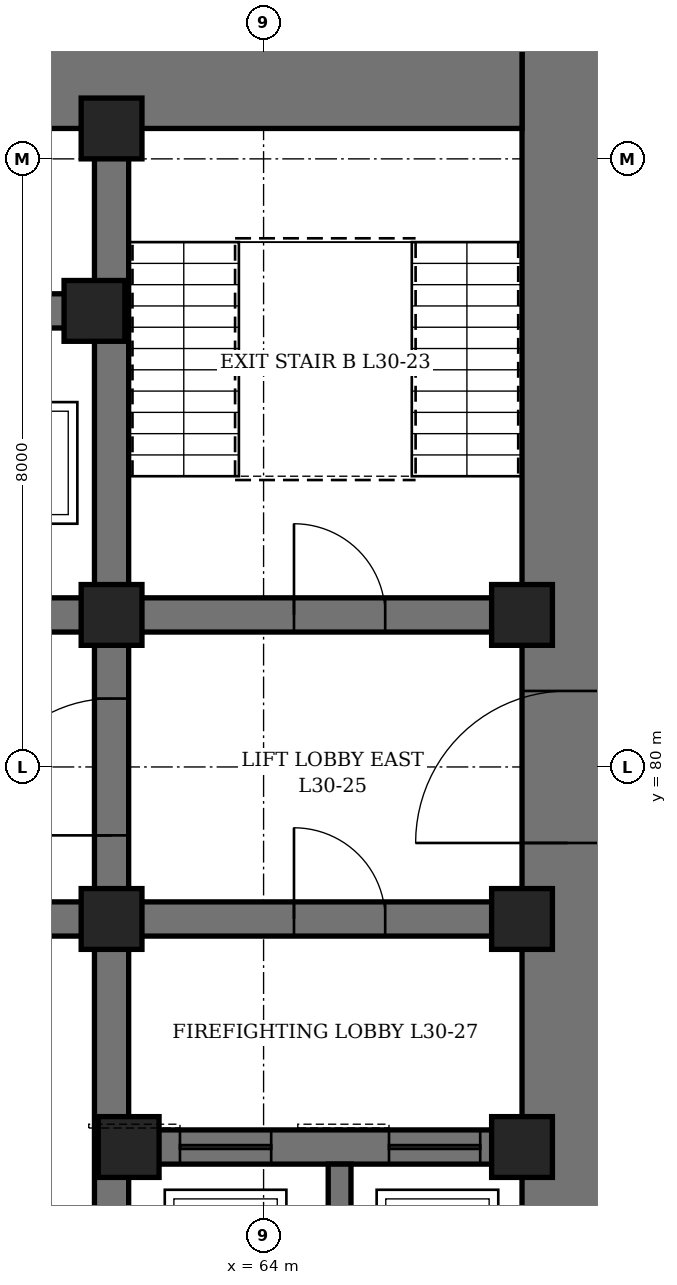
"""IFC4 building model, lengths in metres.
Left out: names, types, materials, properties, quantities, classifications, styles, units other than length and angle.
Written with IfcOpenShell. Run it as: python <this file> out.ifc"""

import sys

from ifc_helpers import new_model, si_unit, direction, frame, frame_2d, origin, origin_2d, place, context, subcontext, project, spatial, rectangle, hollow_rectangle, extrude, element, fill, save


model = new_model("IFC4")
c1 = context("Model", 3, precision=1e-05, world=origin(), true_north=direction((0.0, 1.0)))
c2 = subcontext(c1, "Body", "Model", "MODEL_VIEW")
j1 = project(units=[si_unit("LENGTHUNIT", "METRE"), si_unit("PLANEANGLEUNIT", "RADIAN")], contexts=[c1])
p1 = place(None, origin())
s1 = spatial("IfcSite", under=j1, at=p1, CompositionType="ELEMENT")
p2 = place(p1, origin())
s2 = spatial("IfcBuilding", under=s1, at=p2, CompositionType="ELEMENT")
p3 = place(p2, frame((0.0, 0.0, 137.5)))
s3 = spatial("IfcBuildingStorey", under=s2, at=p3, CompositionType="ELEMENT", Elevation=137.5)
p4 = place(p3, frame((68.0, 70.4, 0.0), z_axis=(0.0, 0.0, 1.0), x_axis=(0.0, 1.0, 0.0)))
e1 = element("IfcWall", 1, at=p4, inside=s3, PredefinedType="SHEAR", context=c2, shape_type="SweptSolid", body=[
    extrude(rectangle(XDim=19.2, YDim=1.2, at=frame_2d((9.6, 0.0))), origin(), (0.0, 0.0, 1.0), 4.2),
])
p5 = place(p4, frame((8.6, 0.0, 0.0)))
e2 = element("IfcOpeningElement", 2, at=p5, cuts=e1, PredefinedType="OPENING", context=c2, shape_type="SweptSolid", body=[
    extrude(rectangle(XDim=2.0, YDim=2.4, at=frame_2d((1.0, 1.2))), frame((0.0, 0.61, 0.0), z_axis=(0.0, -1.0, 0.0), x_axis=(1.0, 0.0, 0.0)), (0.0, 0.0, 1.0), 1.22),
])
p6 = place(p3, frame((44.6, 89.0, 0.0), z_axis=(0.0, 0.0, 1.0), x_axis=(1.0, 0.0, 0.0)))
e3 = element("IfcWall", 3, at=p6, inside=s3, PredefinedType="SHEAR", context=c2, shape_type="SweptSolid", body=[
    extrude(rectangle(XDim=22.8, YDim=1.2, at=frame_2d((11.4, 0.0))), origin(), (0.0, 0.0, 1.0), 4.2),
])
p7 = place(p6, frame((6.325, 0.0, 0.0)))
e4 = element("IfcOpeningElement", 4, at=p7, cuts=e3, PredefinedType="OPENING", context=c2, shape_type="SweptSolid", body=[
    extrude(rectangle(XDim=1.0, YDim=2.1, at=frame_2d((0.5, 1.05))), frame((0.0, 0.61, 0.0), z_axis=(0.0, -1.0, 0.0), x_axis=(1.0, 0.0, 0.0)), (0.0, 0.0, 1.0), 1.22),
])
p8 = place(p6, frame((9.25, 0.0, 0.0)))
e5 = element("IfcOpeningElement", 5, at=p8, cuts=e3, PredefinedType="OPENING", context=c2, shape_type="SweptSolid", body=[
    extrude(rectangle(XDim=0.9, YDim=2.1, at=frame_2d((0.45, 1.05))), frame((0.0, 0.61, 0.0), z_axis=(0.0, -1.0, 0.0), x_axis=(1.0, 0.0, 0.0)), (0.0, 0.0, 1.0), 1.22),
])
p9 = place(p6, frame((12.025, 0.0, 0.0)))
e6 = element("IfcOpeningElement", 6, at=p9, cuts=e3, PredefinedType="OPENING", context=c2, shape_type="SweptSolid", body=[
    extrude(rectangle(XDim=0.9, YDim=2.1, at=frame_2d((0.45, 1.05))), frame((0.0, 0.61, 0.0), z_axis=(0.0, -1.0, 0.0), x_axis=(1.0, 0.0, 0.0)), (0.0, 0.0, 1.0), 1.22),
])
p10 = place(p6, frame((13.962, 0.0, 0.0)))
e7 = element("IfcOpeningElement", 7, at=p10, cuts=e3, PredefinedType="OPENING", context=c2, shape_type="SweptSolid", body=[
    extrude(rectangle(XDim=0.9, YDim=2.1, at=frame_2d((0.45, 1.05))), frame((0.0, 0.61, 0.0), z_axis=(0.0, -1.0, 0.0), x_axis=(1.0, 0.0, 0.0)), (0.0, 0.0, 1.0), 1.22),
])
p11 = place(p3, frame((62.0, 71.6, 0.0), z_axis=(0.0, 0.0, 1.0), x_axis=(0.0, 1.0, 0.0)))
e8 = element("IfcWall", 8, at=p11, inside=s3, PredefinedType="SHEAR", context=c2, shape_type="SweptSolid", body=[
    extrude(rectangle(XDim=16.8, YDim=0.45, at=frame_2d((8.4, 0.0))), origin(), (0.0, 0.0, 1.0), 4.2),
])
p12 = place(p11, frame((7.5, 0.0, 0.0)))
e9 = element("IfcOpeningElement", 9, at=p12, cuts=e8, PredefinedType="OPENING", context=c2, shape_type="SweptSolid", body=[
    extrude(rectangle(XDim=1.8, YDim=2.4, at=frame_2d((0.9, 1.2))), frame((0.0, 0.235, 0.0), z_axis=(0.0, -1.0, 0.0), x_axis=(1.0, 0.0, 0.0)), (0.0, 0.0, 1.0), 0.47),
])
p13 = place(p3, frame((62.225, 75.0, 0.0), z_axis=(0.0, 0.0, 1.0), x_axis=(1.0, 0.0, 0.0)))
e10 = element("IfcWall", 10, at=p13, inside=s3, PredefinedType="SHEAR", context=c2, shape_type="SweptSolid", body=[
    extrude(rectangle(XDim=5.175, YDim=0.45, at=frame_2d((2.587, 0.0))), origin(), (0.0, 0.0, 1.0), 4.2),
])
p14 = place(p13, frame((0.675, 0.0, 0.0)))
e11 = element("IfcOpeningElement", 11, at=p14, cuts=e10, PredefinedType="OPENING", context=c2, shape_type="SweptSolid", body=[
    extrude(rectangle(XDim=1.2, YDim=2.2, at=frame_2d((0.6, 1.1))), frame((0.0, 0.235, 0.0), z_axis=(0.0, -1.0, 0.0), x_axis=(1.0, 0.0, 0.0)), (0.0, 0.0, 1.0), 0.47),
])
p15 = place(p13, frame((3.425, 0.0, 0.0)))
e12 = element("IfcOpeningElement", 12, at=p15, cuts=e10, PredefinedType="OPENING", context=c2, shape_type="SweptSolid", body=[
    extrude(rectangle(XDim=1.2, YDim=2.2, at=frame_2d((0.6, 1.1))), frame((0.0, 0.235, 0.0), z_axis=(0.0, -1.0, 0.0), x_axis=(1.0, 0.0, 0.0)), (0.0, 0.0, 1.0), 0.47),
])
p16 = place(p3, frame((62.225, 78.0, 0.0), z_axis=(0.0, 0.0, 1.0), x_axis=(1.0, 0.0, 0.0)))
e13 = element("IfcWall", 13, at=p16, inside=s3, PredefinedType="SHEAR", context=c2, shape_type="SweptSolid", body=[
    extrude(rectangle(XDim=5.175, YDim=0.45, at=frame_2d((2.587, 0.0))), origin(), (0.0, 0.0, 1.0), 4.2),
])
p17 = place(p16, frame((2.175, 0.0, 0.0)))
e14 = element("IfcOpeningElement", 14, at=p17, cuts=e13, PredefinedType="OPENING", context=c2, shape_type="SweptSolid", body=[
    extrude(rectangle(XDim=1.2, YDim=2.1, at=frame_2d((0.6, 1.05))), frame((0.0, 0.235, 0.0), z_axis=(0.0, -1.0, 0.0), x_axis=(1.0, 0.0, 0.0)), (0.0, 0.0, 1.0), 0.47),
])
p18 = place(p3, frame((62.225, 82.0, 0.0), z_axis=(0.0, 0.0, 1.0), x_axis=(1.0, 0.0, 0.0)))
e15 = element("IfcWall", 15, at=p18, inside=s3, PredefinedType="SHEAR", context=c2, shape_type="SweptSolid", body=[
    extrude(rectangle(XDim=5.175, YDim=0.45, at=frame_2d((2.587, 0.0))), origin(), (0.0, 0.0, 1.0), 4.2),
])
p19 = place(p18, frame((2.175, 0.0, 0.0)))
e16 = element("IfcOpeningElement", 16, at=p19, cuts=e15, PredefinedType="OPENING", context=c2, shape_type="SweptSolid", body=[
    extrude(rectangle(XDim=1.2, YDim=2.1, at=frame_2d((0.6, 1.05))), frame((0.0, 0.235, 0.0), z_axis=(0.0, -1.0, 0.0), x_axis=(1.0, 0.0, 0.0)), (0.0, 0.0, 1.0), 0.47),
])
p20 = place(p3, frame((50.225, 78.0, 0.0), z_axis=(0.0, 0.0, 1.0), x_axis=(1.0, 0.0, 0.0)))
e17 = element("IfcWall", 17, at=p20, inside=s3, PredefinedType="SHEAR", context=c2, shape_type="SweptSolid", body=[
    extrude(rectangle(XDim=11.55, YDim=0.45, at=frame_2d((5.775, 0.0))), origin(), (0.0, 0.0, 1.0), 4.2),
])
p21 = place(p20, frame((0.825, 0.0, 0.0)))
e18 = element("IfcOpeningElement", 18, at=p21, cuts=e17, PredefinedType="OPENING", context=c2, shape_type="SweptSolid", body=[
    extrude(rectangle(XDim=0.9, YDim=2.1, at=frame_2d((0.45, 1.05))), frame((0.0, 0.235, 0.0), z_axis=(0.0, -1.0, 0.0), x_axis=(1.0, 0.0, 0.0)), (0.0, 0.0, 1.0), 0.47),
])
p22 = place(p20, frame((3.825, 0.0, 0.0)))
e19 = element("IfcOpeningElement", 19, at=p22, cuts=e17, PredefinedType="OPENING", context=c2, shape_type="SweptSolid", body=[
    extrude(rectangle(XDim=0.9, YDim=2.1, at=frame_2d((0.45, 1.05))), frame((0.0, 0.235, 0.0), z_axis=(0.0, -1.0, 0.0), x_axis=(1.0, 0.0, 0.0)), (0.0, 0.0, 1.0), 0.47),
])
p23 = place(p20, frame((6.825, 0.0, 0.0)))
e20 = element("IfcOpeningElement", 20, at=p23, cuts=e17, PredefinedType="OPENING", context=c2, shape_type="SweptSolid", body=[
    extrude(rectangle(XDim=0.9, YDim=2.1, at=frame_2d((0.45, 1.05))), frame((0.0, 0.235, 0.0), z_axis=(0.0, -1.0, 0.0), x_axis=(1.0, 0.0, 0.0)), (0.0, 0.0, 1.0), 0.47),
])
p24 = place(p20, frame((9.825, 0.0, 0.0)))
e21 = element("IfcOpeningElement", 21, at=p24, cuts=e17, PredefinedType="OPENING", context=c2, shape_type="SweptSolid", body=[
    extrude(rectangle(XDim=0.9, YDim=2.1, at=frame_2d((0.45, 1.05))), frame((0.0, 0.235, 0.0), z_axis=(0.0, -1.0, 0.0), x_axis=(1.0, 0.0, 0.0)), (0.0, 0.0, 1.0), 0.47),
])
p25 = place(p3, frame((50.225, 82.0, 0.0), z_axis=(0.0, 0.0, 1.0), x_axis=(1.0, 0.0, 0.0)))
e22 = element("IfcWall", 22, at=p25, inside=s3, PredefinedType="SHEAR", context=c2, shape_type="SweptSolid", body=[
    extrude(rectangle(XDim=11.55, YDim=0.45, at=frame_2d((5.775, 0.0))), origin(), (0.0, 0.0, 1.0), 4.2),
])
p26 = place(p25, frame((0.725, 0.0, 0.0)))
e23 = element("IfcOpeningElement", 23, at=p26, cuts=e22, PredefinedType="OPENING", context=c2, shape_type="SweptSolid", body=[
    extrude(rectangle(XDim=1.1, YDim=2.2, at=frame_2d((0.55, 1.1))), frame((0.0, 0.235, 0.0), z_axis=(0.0, -1.0, 0.0), x_axis=(1.0, 0.0, 0.0)), (0.0, 0.0, 1.0), 0.47),
])
p27 = place(p25, frame((3.725, 0.0, 0.0)))
e24 = element("IfcOpeningElement", 24, at=p27, cuts=e22, PredefinedType="OPENING", context=c2, shape_type="SweptSolid", body=[
    extrude(rectangle(XDim=1.1, YDim=2.2, at=frame_2d((0.55, 1.1))), frame((0.0, 0.235, 0.0), z_axis=(0.0, -1.0, 0.0), x_axis=(1.0, 0.0, 0.0)), (0.0, 0.0, 1.0), 0.47),
])
p28 = place(p25, frame((6.725, 0.0, 0.0)))
e25 = element("IfcOpeningElement", 25, at=p28, cuts=e22, PredefinedType="OPENING", context=c2, shape_type="SweptSolid", body=[
    extrude(rectangle(XDim=1.1, YDim=2.2, at=frame_2d((0.55, 1.1))), frame((0.0, 0.235, 0.0), z_axis=(0.0, -1.0, 0.0), x_axis=(1.0, 0.0, 0.0)), (0.0, 0.0, 1.0), 0.47),
])
p29 = place(p25, frame((9.725, 0.0, 0.0)))
e26 = element("IfcOpeningElement", 26, at=p29, cuts=e22, PredefinedType="OPENING", context=c2, shape_type="SweptSolid", body=[
    extrude(rectangle(XDim=1.1, YDim=2.2, at=frame_2d((0.55, 1.1))), frame((0.0, 0.235, 0.0), z_axis=(0.0, -1.0, 0.0), x_axis=(1.0, 0.0, 0.0)), (0.0, 0.0, 1.0), 0.47),
])
p30 = place(p3, frame((50.225, 86.0, 0.0), z_axis=(0.0, 0.0, 1.0), x_axis=(1.0, 0.0, 0.0)))
e27 = element("IfcWall", 27, at=p30, inside=s3, PredefinedType="SHEAR", context=c2, shape_type="SweptSolid", body=[
    extrude(rectangle(XDim=11.55, YDim=0.45, at=frame_2d((5.775, 0.0))), origin(), (0.0, 0.0, 1.0), 4.2),
])
p31 = place(p3, frame((65.0, 71.6, 0.0), z_axis=(0.0, 0.0, 1.0), x_axis=(0.0, 1.0, 0.0)))
e28 = element("IfcWall", 28, at=p31, inside=s3, PredefinedType="SHEAR", context=c2, shape_type="SweptSolid", body=[
    extrude(rectangle(XDim=3.175, YDim=0.3, at=frame_2d((1.587, 0.0))), origin(), (0.0, 0.0, 1.0), 4.2),
])
for number, where, z_axis, x_axis in (
    (29, (61.775, 86.0, 0.0), (0.0, 0.0, 1.0), (1.0, 0.0, 0.0)),
    (30, (62.0, 78.0, 0.0), (0.0, 0.0, 1.0), (1.0, 0.0, 0.0)),
    (31, (62.0, 82.0, 0.0), (0.0, 0.0, 1.0), (1.0, 0.0, 0.0)),
    (32, (62.0, 88.4, 0.0), (0.0, 0.0, 1.0), (1.0, 0.0, 0.0)),
    (33, (62.225, 75.0, 0.0), (0.0, 0.0, 1.0), (1.0, 0.0, 0.0)),
    (34, (67.4, 75.0, 0.0), (0.0, 0.0, 1.0), (1.0, 0.0, 0.0)),
    (35, (67.4, 78.0, 0.0), (0.0, 0.0, 1.0), (1.0, 0.0, 0.0)),
    (36, (67.4, 82.0, 0.0), (0.0, 0.0, 1.0), (1.0, 0.0, 0.0)),
):
    element("IfcColumn", number, at=place(p3, frame(where, z_axis=z_axis, x_axis=x_axis)), inside=s3, PredefinedType="COLUMN", context=c2, shape_type="SweptSolid", body=[
        extrude(hollow_rectangle(XDim=0.8, YDim=0.8, WallThickness=0.1, at=origin_2d()), origin(), (0.0, 0.0, 1.0), 4.2),
    ])
p32 = place(p19, origin())
e37 = element("IfcDoor", 37, at=p32, inside=s3, OperationType="SINGLE_SWING_LEFT", PredefinedType="DOOR", context=c2, shape_type="SweptSolid", body=[
    extrude(rectangle(XDim=1.2, YDim=2.1, at=frame_2d((0.6, 1.05))), frame((0.0, 0.225, 0.0), z_axis=(0.0, -1.0, 0.0), x_axis=(1.0, 0.0, 0.0)), (0.0, 0.0, 1.0), 0.449),
])
fill(e16, e37)
p33 = place(p5, origin())
e38 = element("IfcDoor", 38, at=p33, inside=s3, OperationType="DOUBLE_DOOR_SINGLE_SWING", PredefinedType="DOOR", context=c2, shape_type="SweptSolid", body=[
    extrude(rectangle(XDim=2.0, YDim=2.4, at=frame_2d((1.0, 1.2))), frame((0.0, 0.35, 0.0), z_axis=(0.0, -1.0, 0.0), x_axis=(1.0, 0.0, 0.0)), (0.0, 0.0, 1.0), 0.7),
])
fill(e2, e38)
p34 = place(p12, origin())
e39 = element("IfcDoor", 39, at=p34, inside=s3, OperationType="DOUBLE_DOOR_SINGLE_SWING", PredefinedType="DOOR", context=c2, shape_type="SweptSolid", body=[
    extrude(rectangle(XDim=1.8, YDim=2.4, at=frame_2d((0.9, 1.2))), frame((0.0, 0.225, 0.0), z_axis=(0.0, -1.0, 0.0), x_axis=(1.0, 0.0, 0.0)), (0.0, 0.0, 1.0), 0.449),
])
fill(e9, e39)
p35 = place(p17, origin())
e40 = element("IfcDoor", 40, at=p35, inside=s3, OperationType="SINGLE_SWING_RIGHT", PredefinedType="DOOR", context=c2, shape_type="SweptSolid", body=[
    extrude(rectangle(XDim=1.2, YDim=2.1, at=frame_2d((0.6, 1.05))), frame((0.0, 0.225, 0.0), z_axis=(0.0, -1.0, 0.0), x_axis=(1.0, 0.0, 0.0)), (0.0, 0.0, 1.0), 0.449),
])
fill(e14, e40)
p36 = place(p14, origin())
e41 = element("IfcDoor", 41, at=p36, inside=s3, OperationType="SLIDING_TO_LEFT", PredefinedType="DOOR", context=c2, shape_type="SweptSolid", body=[
    extrude(rectangle(XDim=1.2, YDim=2.2, at=frame_2d((0.6, 1.1))), frame((0.0, 0.225, 0.0), z_axis=(0.0, -1.0, 0.0), x_axis=(1.0, 0.0, 0.0)), (0.0, 0.0, 1.0), 0.449),
])
fill(e11, e41)
p37 = place(p15, origin())
e42 = element("IfcDoor", 42, at=p37, inside=s3, OperationType="SLIDING_TO_LEFT", PredefinedType="DOOR", context=c2, shape_type="SweptSolid", body=[
    extrude(rectangle(XDim=1.2, YDim=2.2, at=frame_2d((0.6, 1.1))), frame((0.0, 0.225, 0.0), z_axis=(0.0, -1.0, 0.0), x_axis=(1.0, 0.0, 0.0)), (0.0, 0.0, 1.0), 0.449),
])
fill(e12, e42)
save(model, sys.argv[1])
